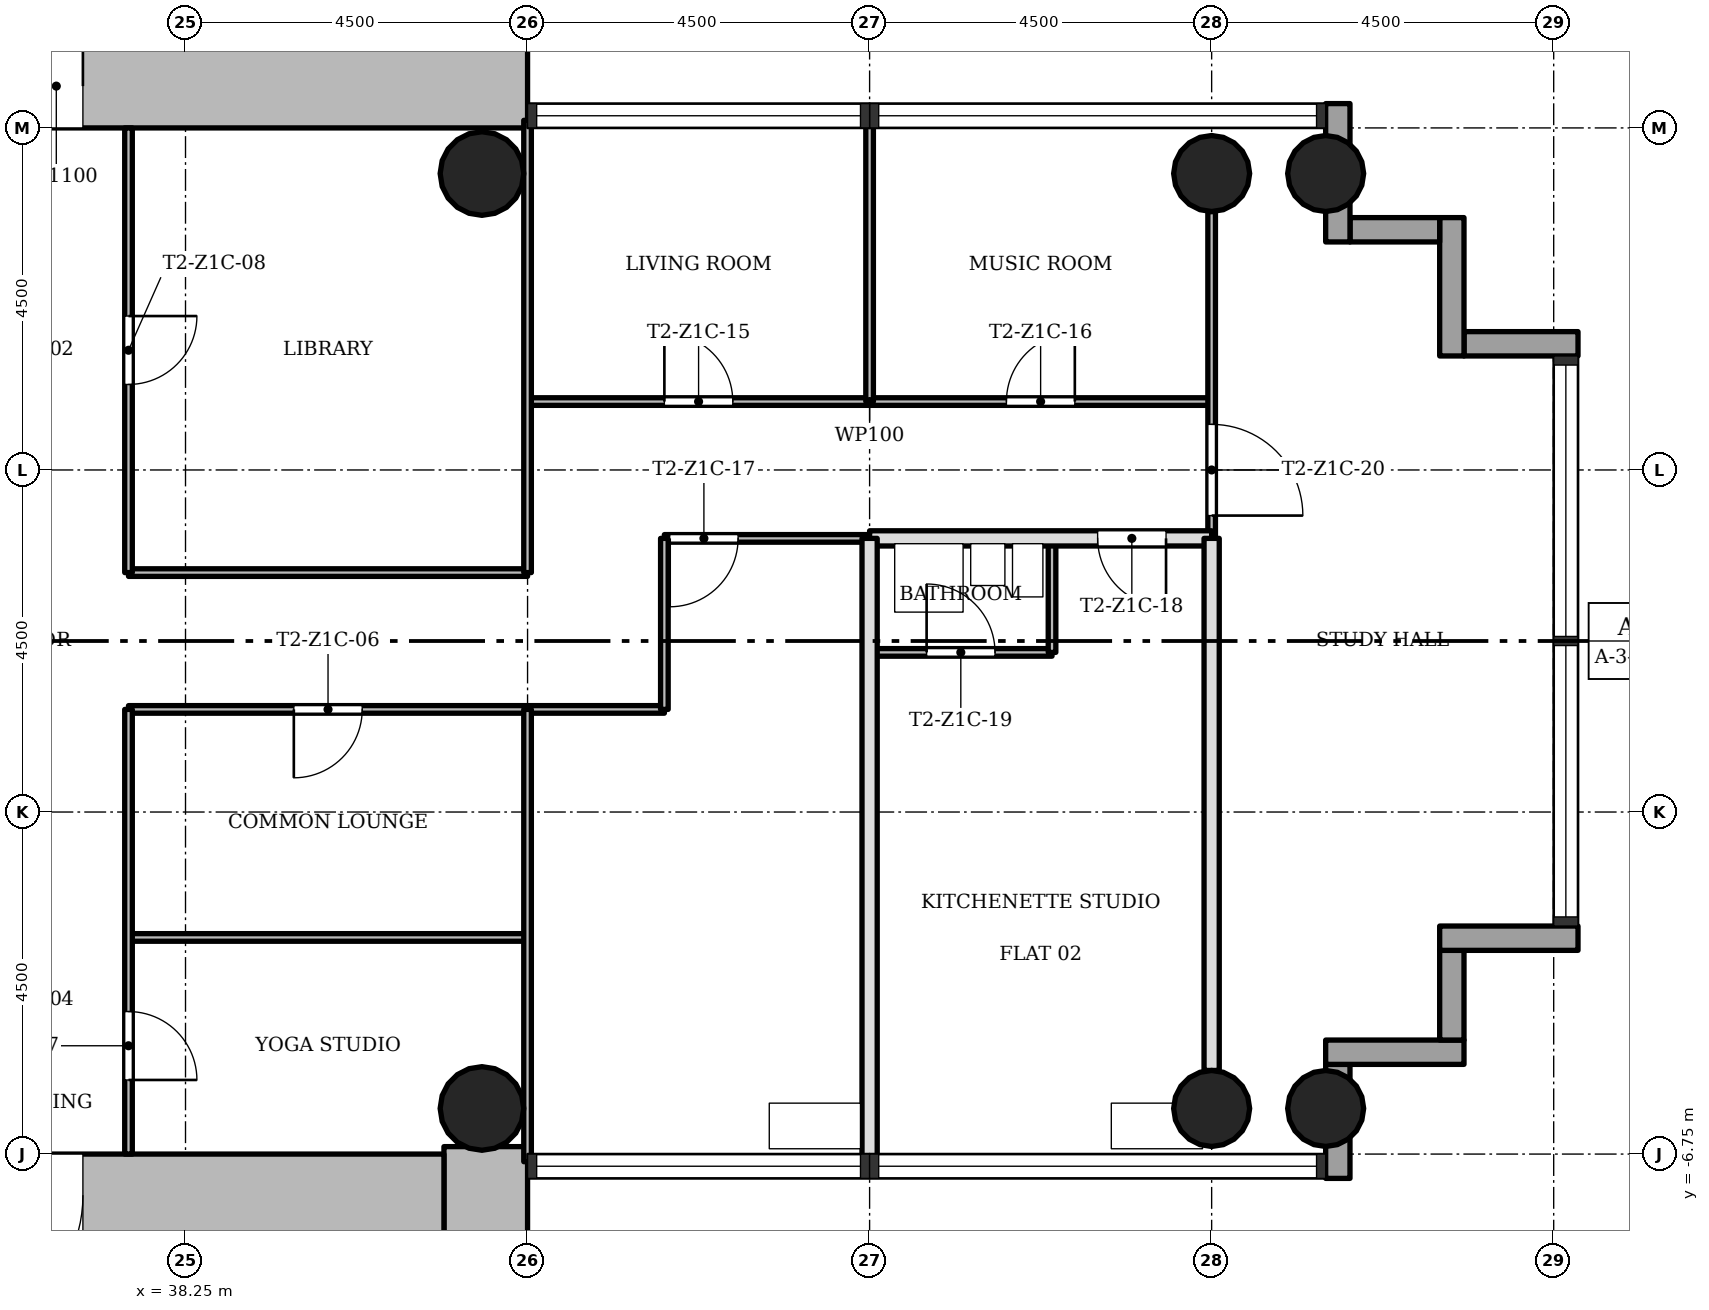
"""IFC4 building model, lengths in metres.
Left out: names, types, materials, properties, quantities, classifications, styles, units other than length and angle.
Written with IfcOpenShell. Run it as: python <this file> out.ifc"""

import sys

from ifc_helpers import new_model, si_unit, direction, frame, frame_2d, origin, origin_2d, place, context, subcontext, project, spatial, rectangle, hollow_circle, extrude, element, fill, save


model = new_model("IFC4")
c1 = context("Model", 3, precision=1e-05, world=origin(), true_north=direction((0.0, 1.0)))
c2 = subcontext(c1, "Body", "Model", "MODEL_VIEW")
j1 = project(units=[si_unit("LENGTHUNIT", "METRE"), si_unit("PLANEANGLEUNIT", "RADIAN")], contexts=[c1])
p1 = place(None, origin())
s1 = spatial("IfcSite", under=j1, at=p1, CompositionType="ELEMENT")
p2 = place(p1, origin())
s2 = spatial("IfcBuilding", under=s1, at=p2, CompositionType="ELEMENT")
p3 = place(p2, frame((0.0, 0.0, 48.3)))
s3 = spatial("IfcBuildingStorey", under=s2, at=p3, CompositionType="ELEMENT", Elevation=48.3)
p4 = place(p3, frame((30.35, 7.3, 0.0), z_axis=(0.0, 0.0, 1.0), x_axis=(1.0, 0.0, 0.0)))
e1 = element("IfcWall", 1, at=p4, inside=s3, PredefinedType="SHEAR", context=c2, shape_type="SweptSolid", body=[
    extrude(rectangle(XDim=12.4, YDim=1.1, at=frame_2d((6.2, 0.0))), origin(), (0.0, 0.0, 1.0), 3.4),
])
p5 = place(p4, frame((4.75, 0.0, 0.0)))
e2 = element("IfcOpeningElement", 2, at=p5, cuts=e1, PredefinedType="OPENING", context=c2, shape_type="SweptSolid", body=[
    extrude(rectangle(XDim=1.8, YDim=2.1, at=frame_2d((0.9, 1.05))), frame((0.0, 0.56, 0.0), z_axis=(0.0, -1.0, 0.0), x_axis=(1.0, 0.0, 0.0)), (0.0, 0.0, 1.0), 1.12),
])
p6 = place(p3, frame((42.2, -15.248, 0.0), z_axis=(0.0, 0.0, 1.0), x_axis=(0.0, 1.0, 0.0)))
e3 = element("IfcWall", 3, at=p6, inside=s3, PredefinedType="SHEAR", context=c2, shape_type="SweptSolid", body=[
    extrude(rectangle(XDim=8.596, YDim=1.1, at=frame_2d((4.298, 0.0))), origin(), (0.0, 0.0, 1.0), 3.4),
])
p7 = place(p3, frame((41.65, -7.3, 0.0), z_axis=(0.0, 0.0, 1.0), x_axis=(-1.0, 0.0, 0.0)))
e4 = element("IfcWall", 4, at=p7, inside=s3, PredefinedType="SHEAR", context=c2, shape_type="SweptSolid", body=[
    extrude(rectangle(XDim=12.4, YDim=1.1, at=frame_2d((6.2, 0.0))), origin(), (0.0, 0.0, 1.0), 3.4),
])
p8 = place(p7, frame((4.75, 0.0, 0.0)))
e5 = element("IfcOpeningElement", 5, at=p8, cuts=e4, PredefinedType="OPENING", context=c2, shape_type="SweptSolid", body=[
    extrude(rectangle(XDim=1.8, YDim=2.1, at=frame_2d((0.9, 1.05))), frame((0.0, 0.56, 0.0), z_axis=(0.0, -1.0, 0.0), x_axis=(1.0, 0.0, 0.0)), (0.0, 0.0, 1.0), 1.12),
])
for number, where, z_axis, x_axis in (
    (6, (51.75, -6.15, 0.0), (0.0, 0.0, 1.0), (1.0, 0.0, 0.0)),
    (7, (51.75, 6.15, 0.0), (0.0, 0.0, 1.0), (1.0, 0.0, 0.0)),
    (8, (53.25, -6.15, 0.0), (0.0, 0.0, 1.0), (1.0, 0.0, 0.0)),
    (9, (53.25, 6.15, 0.0), (0.0, 0.0, 1.0), (1.0, 0.0, 0.0)),
):
    element("IfcColumn", number, at=place(p3, frame(where, z_axis=z_axis, x_axis=x_axis)), inside=s3, PredefinedType="COLUMN", context=c2, shape_type="SweptSolid", body=[
        extrude(hollow_circle(Radius=0.5, WallThickness=0.036, at=origin_2d()), origin(), (0.0, 0.0, 1.0), 3.4),
    ])
for number, where, z_axis, x_axis in (
    (10, (42.15, -6.15, 0.0), (0.0, 0.0, 1.0), (1.0, 0.0, 0.0)),
    (11, (42.15, 6.15, 0.0), (0.0, 0.0, 1.0), (1.0, 0.0, 0.0)),
):
    element("IfcColumn", number, at=place(p3, frame(where, z_axis=z_axis, x_axis=x_axis)), inside=s3, PredefinedType="COLUMN", context=c2, shape_type="SweptSolid", body=[
        extrude(hollow_circle(Radius=0.55, WallThickness=0.04, at=origin_2d()), origin(), (0.0, 0.0, 1.0), 3.4),
    ])
p9 = place(p3, frame((53.41, -7.07, -0.3), z_axis=(0.0, 0.0, 1.0), x_axis=(0.0, 1.0, 0.0)))
e12 = element("IfcWall", 12, at=p9, inside=s3, PredefinedType="STANDARD", context=c2, shape_type="SweptSolid", body=[
    extrude(rectangle(XDim=1.5, YDim=0.32, at=frame_2d((0.75, 0.0))), origin(), (0.0, 0.0, 1.0), 3.4),
])
p10 = place(p3, frame((53.25, -5.41, -0.3), z_axis=(0.0, 0.0, 1.0), x_axis=(1.0, 0.0, 0.0)))
e13 = element("IfcWall", 13, at=p10, inside=s3, PredefinedType="STANDARD", context=c2, shape_type="SweptSolid", body=[
    extrude(rectangle(XDim=1.82, YDim=0.32, at=frame_2d((0.91, 0.0))), origin(), (0.0, 0.0, 1.0), 3.4),
])
p11 = place(p3, frame((54.91, -5.25, -0.3), z_axis=(0.0, 0.0, 1.0), x_axis=(0.0, 1.0, 0.0)))
e14 = element("IfcWall", 14, at=p11, inside=s3, PredefinedType="STANDARD", context=c2, shape_type="SweptSolid", body=[
    extrude(rectangle(XDim=1.18, YDim=0.32, at=frame_2d((0.59, 0.0))), origin(), (0.0, 0.0, 1.0), 3.4),
])
p12 = place(p3, frame((54.75, -3.91, -0.3), z_axis=(0.0, 0.0, 1.0), x_axis=(1.0, 0.0, 0.0)))
e15 = element("IfcWall", 15, at=p12, inside=s3, PredefinedType="STANDARD", context=c2, shape_type="SweptSolid", body=[
    extrude(rectangle(XDim=1.82, YDim=0.32, at=frame_2d((0.91, 0.0))), origin(), (0.0, 0.0, 1.0), 3.4),
])
p13 = place(p3, frame((56.57, 3.91, -0.3), z_axis=(0.0, 0.0, 1.0), x_axis=(-1.0, 0.0, 0.0)))
e16 = element("IfcWall", 16, at=p13, inside=s3, PredefinedType="STANDARD", context=c2, shape_type="SweptSolid", body=[
    extrude(rectangle(XDim=1.5, YDim=0.32, at=frame_2d((0.75, 0.0))), origin(), (0.0, 0.0, 1.0), 3.4),
])
p14 = place(p3, frame((54.91, 3.75, -0.3), z_axis=(0.0, 0.0, 1.0), x_axis=(0.0, 1.0, 0.0)))
e17 = element("IfcWall", 17, at=p14, inside=s3, PredefinedType="STANDARD", context=c2, shape_type="SweptSolid", body=[
    extrude(rectangle(XDim=1.82, YDim=0.32, at=frame_2d((0.91, 0.0))), origin(), (0.0, 0.0, 1.0), 3.4),
])
p15 = place(p3, frame((54.75, 5.41, -0.3), z_axis=(0.0, 0.0, 1.0), x_axis=(-1.0, 0.0, 0.0)))
e18 = element("IfcWall", 18, at=p15, inside=s3, PredefinedType="STANDARD", context=c2, shape_type="SweptSolid", body=[
    extrude(rectangle(XDim=1.18, YDim=0.32, at=frame_2d((0.59, 0.0))), origin(), (0.0, 0.0, 1.0), 3.4),
])
p16 = place(p3, frame((53.41, 5.25, -0.3), z_axis=(0.0, 0.0, 1.0), x_axis=(0.0, 1.0, 0.0)))
e19 = element("IfcWall", 19, at=p16, inside=s3, PredefinedType="STANDARD", context=c2, shape_type="SweptSolid", body=[
    extrude(rectangle(XDim=1.82, YDim=0.32, at=frame_2d((0.91, 0.0))), origin(), (0.0, 0.0, 1.0), 3.4),
])
p17 = place(p3, frame((42.75, -3.9, 0.0), z_axis=(0.0, 0.0, 1.0), x_axis=(-1.0, 0.0, 0.0)))
e20 = element("IfcWall", 20, at=p17, inside=s3, PredefinedType="PARTITIONING", context=c2, shape_type="SweptSolid", body=[
    extrude(rectangle(XDim=5.25, YDim=0.1, at=frame_2d((2.625, 0.0))), origin(), (0.0, 0.0, 1.0), 3.0),
])
p18 = place(p3, frame((44.55, -0.9, 0.0), z_axis=(0.0, 0.0, 1.0), x_axis=(-1.0, 0.0, 0.0)))
e21 = element("IfcWall", 21, at=p18, inside=s3, PredefinedType="PARTITIONING", context=c2, shape_type="SweptSolid", body=[
    extrude(rectangle(XDim=7.05, YDim=0.1, at=frame_2d((3.525, 0.0))), origin(), (0.0, 0.0, 1.0), 3.0),
])
p19 = place(p18, frame((3.975, 0.0, 0.0)))
e22 = element("IfcOpeningElement", 22, at=p19, cuts=e21, PredefinedType="OPENING", context=c2, shape_type="SweptSolid", body=[
    extrude(rectangle(XDim=0.9, YDim=2.1, at=frame_2d((0.45, 1.05))), frame((0.0, 0.06, 0.0), z_axis=(0.0, -1.0, 0.0), x_axis=(1.0, 0.0, 0.0)), (0.0, 0.0, 1.0), 0.12),
])
p20 = place(p3, frame((49.65, -0.15, 0.0), z_axis=(0.0, 0.0, 1.0), x_axis=(-1.0, 0.0, 0.0)))
e23 = element("IfcWall", 23, at=p20, inside=s3, PredefinedType="PARTITIONING", context=c2, shape_type="SweptSolid", body=[
    extrude(rectangle(XDim=2.4, YDim=0.1, at=frame_2d((1.2, 0.0))), origin(), (0.0, 0.0, 1.0), 3.0),
])
p21 = place(p20, frame((0.75, 0.0, 0.0)))
e24 = element("IfcOpeningElement", 24, at=p21, cuts=e23, PredefinedType="OPENING", context=c2, shape_type="SweptSolid", body=[
    extrude(rectangle(XDim=0.9, YDim=2.1, at=frame_2d((0.45, 1.05))), frame((0.0, 0.06, 0.0), z_axis=(0.0, -1.0, 0.0), x_axis=(1.0, 0.0, 0.0)), (0.0, 0.0, 1.0), 0.12),
])
p22 = place(p3, frame((42.75, 0.9, 0.0), z_axis=(0.0, 0.0, 1.0), x_axis=(-1.0, 0.0, 0.0)))
e25 = element("IfcWall", 25, at=p22, inside=s3, PredefinedType="PARTITIONING", context=c2, shape_type="SweptSolid", body=[
    extrude(rectangle(XDim=5.25, YDim=0.1, at=frame_2d((2.625, 0.0))), origin(), (0.0, 0.0, 1.0), 3.0),
])
p23 = place(p3, frame((47.25, 1.35, 0.0), z_axis=(0.0, 0.0, 1.0), x_axis=(-1.0, 0.0, 0.0)))
e26 = element("IfcWall", 26, at=p23, inside=s3, PredefinedType="PARTITIONING", context=c2, shape_type="SweptSolid", body=[
    extrude(rectangle(XDim=2.7, YDim=0.1, at=frame_2d((1.35, 0.0))), origin(), (0.0, 0.0, 1.0), 3.0),
])
p24 = place(p23, frame((1.73, 0.0, 0.0)))
e27 = element("IfcOpeningElement", 27, at=p24, cuts=e26, PredefinedType="OPENING", context=c2, shape_type="SweptSolid", body=[
    extrude(rectangle(XDim=0.9, YDim=2.1, at=frame_2d((0.45, 1.05))), frame((0.0, 0.06, 0.0), z_axis=(0.0, -1.0, 0.0), x_axis=(1.0, 0.0, 0.0)), (0.0, 0.0, 1.0), 0.12),
])
p25 = place(p3, frame((51.75, 1.35, 0.0), z_axis=(0.0, 0.0, 1.0), x_axis=(-1.0, 0.0, 0.0)))
e28 = element("IfcWall", 28, at=p25, inside=s3, PredefinedType="SOLIDWALL", context=c2, shape_type="SweptSolid", body=[
    extrude(rectangle(XDim=4.5, YDim=0.2, at=frame_2d((2.25, 0.0))), origin(), (0.0, 0.0, 1.0), 3.0),
])
p26 = place(p25, frame((0.6, 0.0, 0.0)))
e29 = element("IfcOpeningElement", 29, at=p26, cuts=e28, PredefinedType="OPENING", context=c2, shape_type="SweptSolid", body=[
    extrude(rectangle(XDim=0.9, YDim=2.1, at=frame_2d((0.45, 1.05))), frame((0.0, 0.11, 0.0), z_axis=(0.0, -1.0, 0.0), x_axis=(1.0, 0.0, 0.0)), (0.0, 0.0, 1.0), 0.22),
])
p27 = place(p3, frame((51.75, 3.15, 0.0), z_axis=(0.0, 0.0, 1.0), x_axis=(-1.0, 0.0, 0.0)))
e30 = element("IfcWall", 30, at=p27, inside=s3, PredefinedType="PARTITIONING", context=c2, shape_type="SweptSolid", body=[
    extrude(rectangle(XDim=9.0, YDim=0.1, at=frame_2d((4.5, 0.0))), origin(), (0.0, 0.0, 1.0), 3.0),
])
p28 = place(p27, frame((6.3, 0.0, 0.0)))
e31 = element("IfcOpeningElement", 31, at=p28, cuts=e30, PredefinedType="OPENING", context=c2, shape_type="SweptSolid", body=[
    extrude(rectangle(XDim=0.9, YDim=2.1, at=frame_2d((0.45, 1.05))), frame((0.0, 0.06, 0.0), z_axis=(0.0, -1.0, 0.0), x_axis=(1.0, 0.0, 0.0)), (0.0, 0.0, 1.0), 0.12),
])
p29 = place(p27, frame((1.8, 0.0, 0.0)))
e32 = element("IfcOpeningElement", 32, at=p29, cuts=e30, PredefinedType="OPENING", context=c2, shape_type="SweptSolid", body=[
    extrude(rectangle(XDim=0.9, YDim=2.1, at=frame_2d((0.45, 1.05))), frame((0.0, 0.06, 0.0), z_axis=(0.0, -1.0, 0.0), x_axis=(1.0, 0.0, 0.0)), (0.0, 0.0, 1.0), 0.12),
])
p30 = place(p3, frame((51.75, 1.35, 0.0), z_axis=(0.0, 0.0, 1.0), x_axis=(0.0, 1.0, 0.0)))
e33 = element("IfcWall", 33, at=p30, inside=s3, PredefinedType="PARTITIONING", context=c2, shape_type="SweptSolid", body=[
    extrude(rectangle(XDim=4.3, YDim=0.1, at=frame_2d((2.15, 0.0))), origin(), (0.0, 0.0, 1.0), 3.0),
])
p31 = place(p30, frame((0.3, 0.0, 0.0)))
e34 = element("IfcOpeningElement", 34, at=p31, cuts=e33, PredefinedType="OPENING", context=c2, shape_type="SweptSolid", body=[
    extrude(rectangle(XDim=1.2, YDim=2.1, at=frame_2d((0.6, 1.05))), frame((0.0, 0.06, 0.0), z_axis=(0.0, -1.0, 0.0), x_axis=(1.0, 0.0, 0.0)), (0.0, 0.0, 1.0), 0.12),
])
p32 = place(p3, frame((51.75, -5.65, 0.0), z_axis=(0.0, 0.0, 1.0), x_axis=(0.0, 1.0, 0.0)))
e35 = element("IfcWall", 35, at=p32, inside=s3, PredefinedType="SOLIDWALL", context=c2, shape_type="SweptSolid", body=[
    extrude(rectangle(XDim=7.0, YDim=0.2, at=frame_2d((3.5, 0.0))), origin(), (0.0, 0.0, 1.0), 3.0),
])
p33 = place(p3, frame((49.65, -0.15, 0.0), z_axis=(0.0, 0.0, 1.0), x_axis=(0.0, 1.0, 0.0)))
e36 = element("IfcWall", 36, at=p33, inside=s3, PredefinedType="PARTITIONING", context=c2, shape_type="SweptSolid", body=[
    extrude(rectangle(XDim=1.5, YDim=0.1, at=frame_2d((0.75, 0.0))), origin(), (0.0, 0.0, 1.0), 3.0),
])
p34 = place(p3, frame((47.25, 3.15, 0.0), z_axis=(0.0, 0.0, 1.0), x_axis=(0.0, 1.0, 0.0)))
e37 = element("IfcWall", 37, at=p34, inside=s3, PredefinedType="PARTITIONING", context=c2, shape_type="SweptSolid", body=[
    extrude(rectangle(XDim=3.7, YDim=0.1, at=frame_2d((1.85, 0.0))), origin(), (0.0, 0.0, 1.0), 3.0),
])
p35 = place(p3, frame((47.25, -6.85, 0.0), z_axis=(0.0, 0.0, 1.0), x_axis=(0.0, 1.0, 0.0)))
e38 = element("IfcWall", 38, at=p35, inside=s3, PredefinedType="SOLIDWALL", context=c2, shape_type="SweptSolid", body=[
    extrude(rectangle(XDim=8.2, YDim=0.2, at=frame_2d((4.1, 0.0))), origin(), (0.0, 0.0, 1.0), 3.0),
])
p36 = place(p3, frame((44.55, -0.9, 0.0), z_axis=(0.0, 0.0, 1.0), x_axis=(0.0, 1.0, 0.0)))
e39 = element("IfcWall", 39, at=p36, inside=s3, PredefinedType="PARTITIONING", context=c2, shape_type="SweptSolid", body=[
    extrude(rectangle(XDim=2.25, YDim=0.1, at=frame_2d((1.125, 0.0))), origin(), (0.0, 0.0, 1.0), 3.0),
])
for number, where, z_axis, x_axis in (
    (40, (42.75, -6.85, 0.0), (0.0, 0.0, 1.0), (0.0, 1.0, 0.0)),
    (41, (42.75, 0.9, 0.0), (0.0, 0.0, 1.0), (0.0, 1.0, 0.0)),
):
    element("IfcWall", number, at=place(p3, frame(where, z_axis=z_axis, x_axis=x_axis)), inside=s3, PredefinedType="PARTITIONING", context=c2, shape_type="SweptSolid", body=[
        extrude(rectangle(XDim=5.95, YDim=0.1, at=frame_2d((2.975, 0.0))), origin(), (0.0, 0.0, 1.0), 3.0),
    ])
p37 = place(p3, frame((37.5, -6.75, 0.0), z_axis=(0.0, 0.0, 1.0), x_axis=(0.0, 1.0, 0.0)))
e42 = element("IfcWall", 42, at=p37, inside=s3, PredefinedType="PARTITIONING", context=c2, shape_type="SweptSolid", body=[
    extrude(rectangle(XDim=5.85, YDim=0.1, at=frame_2d((2.925, 0.0))), origin(), (0.0, 0.0, 1.0), 3.0),
])
p38 = place(p37, frame((0.975, 0.0, 0.0)))
e43 = element("IfcOpeningElement", 43, at=p38, cuts=e42, PredefinedType="OPENING", context=c2, shape_type="SweptSolid", body=[
    extrude(rectangle(XDim=0.9, YDim=2.1, at=frame_2d((0.45, 1.05))), frame((0.0, 0.06, 0.0), z_axis=(0.0, -1.0, 0.0), x_axis=(1.0, 0.0, 0.0)), (0.0, 0.0, 1.0), 0.12),
])
p39 = place(p3, frame((37.5, 0.9, 0.0), z_axis=(0.0, 0.0, 1.0), x_axis=(0.0, 1.0, 0.0)))
e44 = element("IfcWall", 44, at=p39, inside=s3, PredefinedType="PARTITIONING", context=c2, shape_type="SweptSolid", body=[
    extrude(rectangle(XDim=5.85, YDim=0.1, at=frame_2d((2.925, 0.0))), origin(), (0.0, 0.0, 1.0), 3.0),
])
p40 = place(p39, frame((2.475, 0.0, 0.0)))
e45 = element("IfcOpeningElement", 45, at=p40, cuts=e44, PredefinedType="OPENING", context=c2, shape_type="SweptSolid", body=[
    extrude(rectangle(XDim=0.9, YDim=2.1, at=frame_2d((0.45, 1.05))), frame((0.0, 0.06, 0.0), z_axis=(0.0, -1.0, 0.0), x_axis=(1.0, 0.0, 0.0)), (0.0, 0.0, 1.0), 0.12),
])
p41 = place(p19, origin())
e46 = element("IfcDoor", 46, at=p41, inside=s3, OperationType="SINGLE_SWING_LEFT", PredefinedType="DOOR", context=c2, shape_type="SweptSolid", body=[
    extrude(rectangle(XDim=0.9, YDim=2.1, at=frame_2d((0.45, 1.05))), frame((0.0, 0.025, 0.0), z_axis=(0.0, -1.0, 0.0), x_axis=(1.0, 0.0, 0.0)), (0.0, 0.0, 1.0), 0.05),
])
fill(e22, e46)
p42 = place(p38, origin())
e47 = element("IfcDoor", 47, at=p42, inside=s3, OperationType="SINGLE_SWING_LEFT", PredefinedType="DOOR", context=c2, shape_type="SweptSolid", body=[
    extrude(rectangle(XDim=0.9, YDim=2.1, at=frame_2d((0.45, 1.05))), frame((0.0, 0.025, 0.0), z_axis=(0.0, -1.0, 0.0), x_axis=(1.0, 0.0, 0.0)), (0.0, 0.0, 1.0), 0.05),
])
fill(e43, e47)
p43 = place(p40, origin())
e48 = element("IfcDoor", 48, at=p43, inside=s3, OperationType="SINGLE_SWING_RIGHT", PredefinedType="DOOR", context=c2, shape_type="SweptSolid", body=[
    extrude(rectangle(XDim=0.9, YDim=2.1, at=frame_2d((0.45, 1.05))), frame((0.0, 0.025, 0.0), z_axis=(0.0, -1.0, 0.0), x_axis=(1.0, 0.0, 0.0)), (0.0, 0.0, 1.0), 0.05),
])
fill(e45, e48)
p44 = place(p28, origin())
e49 = element("IfcDoor", 49, at=p44, inside=s3, OperationType="SINGLE_SWING_RIGHT", PredefinedType="DOOR", context=c2, shape_type="SweptSolid", body=[
    extrude(rectangle(XDim=0.9, YDim=2.1, at=frame_2d((0.45, 1.05))), frame((0.0, 0.025, 0.0), z_axis=(0.0, -1.0, 0.0), x_axis=(1.0, 0.0, 0.0)), (0.0, 0.0, 1.0), 0.05),
])
fill(e31, e49)
p45 = place(p29, origin())
e50 = element("IfcDoor", 50, at=p45, inside=s3, OperationType="SINGLE_SWING_LEFT", PredefinedType="DOOR", context=c2, shape_type="SweptSolid", body=[
    extrude(rectangle(XDim=0.9, YDim=2.1, at=frame_2d((0.45, 1.05))), frame((0.0, 0.025, 0.0), z_axis=(0.0, -1.0, 0.0), x_axis=(1.0, 0.0, 0.0)), (0.0, 0.0, 1.0), 0.05),
])
fill(e32, e50)
p46 = place(p24, origin())
e51 = element("IfcDoor", 51, at=p46, inside=s3, OperationType="SINGLE_SWING_LEFT", PredefinedType="DOOR", context=c2, shape_type="SweptSolid", body=[
    extrude(rectangle(XDim=0.9, YDim=2.1, at=frame_2d((0.45, 1.05))), frame((0.0, 0.025, 0.0), z_axis=(0.0, -1.0, 0.0), x_axis=(1.0, 0.0, 0.0)), (0.0, 0.0, 1.0), 0.05),
])
fill(e27, e51)
p47 = place(p26, origin())
e52 = element("IfcDoor", 52, at=p47, inside=s3, OperationType="SINGLE_SWING_RIGHT", PredefinedType="DOOR", context=c2, shape_type="SweptSolid", body=[
    extrude(rectangle(XDim=0.9, YDim=2.1, at=frame_2d((0.45, 1.05))), frame((0.0, 0.025, 0.0), z_axis=(0.0, -1.0, 0.0), x_axis=(1.0, 0.0, 0.0)), (0.0, 0.0, 1.0), 0.05),
])
fill(e29, e52)
p48 = place(p21, origin())
e53 = element("IfcDoor", 53, at=p48, inside=s3, OperationType="SINGLE_SWING_RIGHT", PredefinedType="DOOR", context=c2, shape_type="SweptSolid", body=[
    extrude(rectangle(XDim=0.9, YDim=2.1, at=frame_2d((0.45, 1.05))), frame((0.0, 0.025, 0.0), z_axis=(0.0, -1.0, 0.0), x_axis=(1.0, 0.0, 0.0)), (0.0, 0.0, 1.0), 0.05),
])
fill(e24, e53)
p49 = place(p31, origin())
e54 = element("IfcDoor", 54, at=p49, inside=s3, OperationType="SINGLE_SWING_LEFT", PredefinedType="DOOR", context=c2, shape_type="SweptSolid", body=[
    extrude(rectangle(XDim=1.2, YDim=2.1, at=frame_2d((0.6, 1.05))), frame((0.0, 0.025, 0.0), z_axis=(0.0, -1.0, 0.0), x_axis=(1.0, 0.0, 0.0)), (0.0, 0.0, 1.0), 0.05),
])
fill(e34, e54)
p50 = place(p5, origin())
e55 = element("IfcDoor", 55, at=p50, inside=s3, OperationType="SINGLE_SWING_LEFT", PredefinedType="DOOR", context=c2, shape_type="SweptSolid", body=[
    extrude(rectangle(XDim=1.8, YDim=2.1, at=frame_2d((0.9, 1.05))), frame((0.0, 0.025, 0.0), z_axis=(0.0, -1.0, 0.0), x_axis=(1.0, 0.0, 0.0)), (0.0, 0.0, 1.0), 0.05),
])
fill(e2, e55)
p51 = place(p8, origin())
e56 = element("IfcDoor", 56, at=p51, inside=s3, OperationType="SINGLE_SWING_LEFT", PredefinedType="DOOR", context=c2, shape_type="SweptSolid", body=[
    extrude(rectangle(XDim=1.8, YDim=2.1, at=frame_2d((0.9, 1.05))), frame((0.0, 0.025, 0.0), z_axis=(0.0, -1.0, 0.0), x_axis=(1.0, 0.0, 0.0)), (0.0, 0.0, 1.0), 0.05),
])
fill(e5, e56)
save(model, sys.argv[1])
